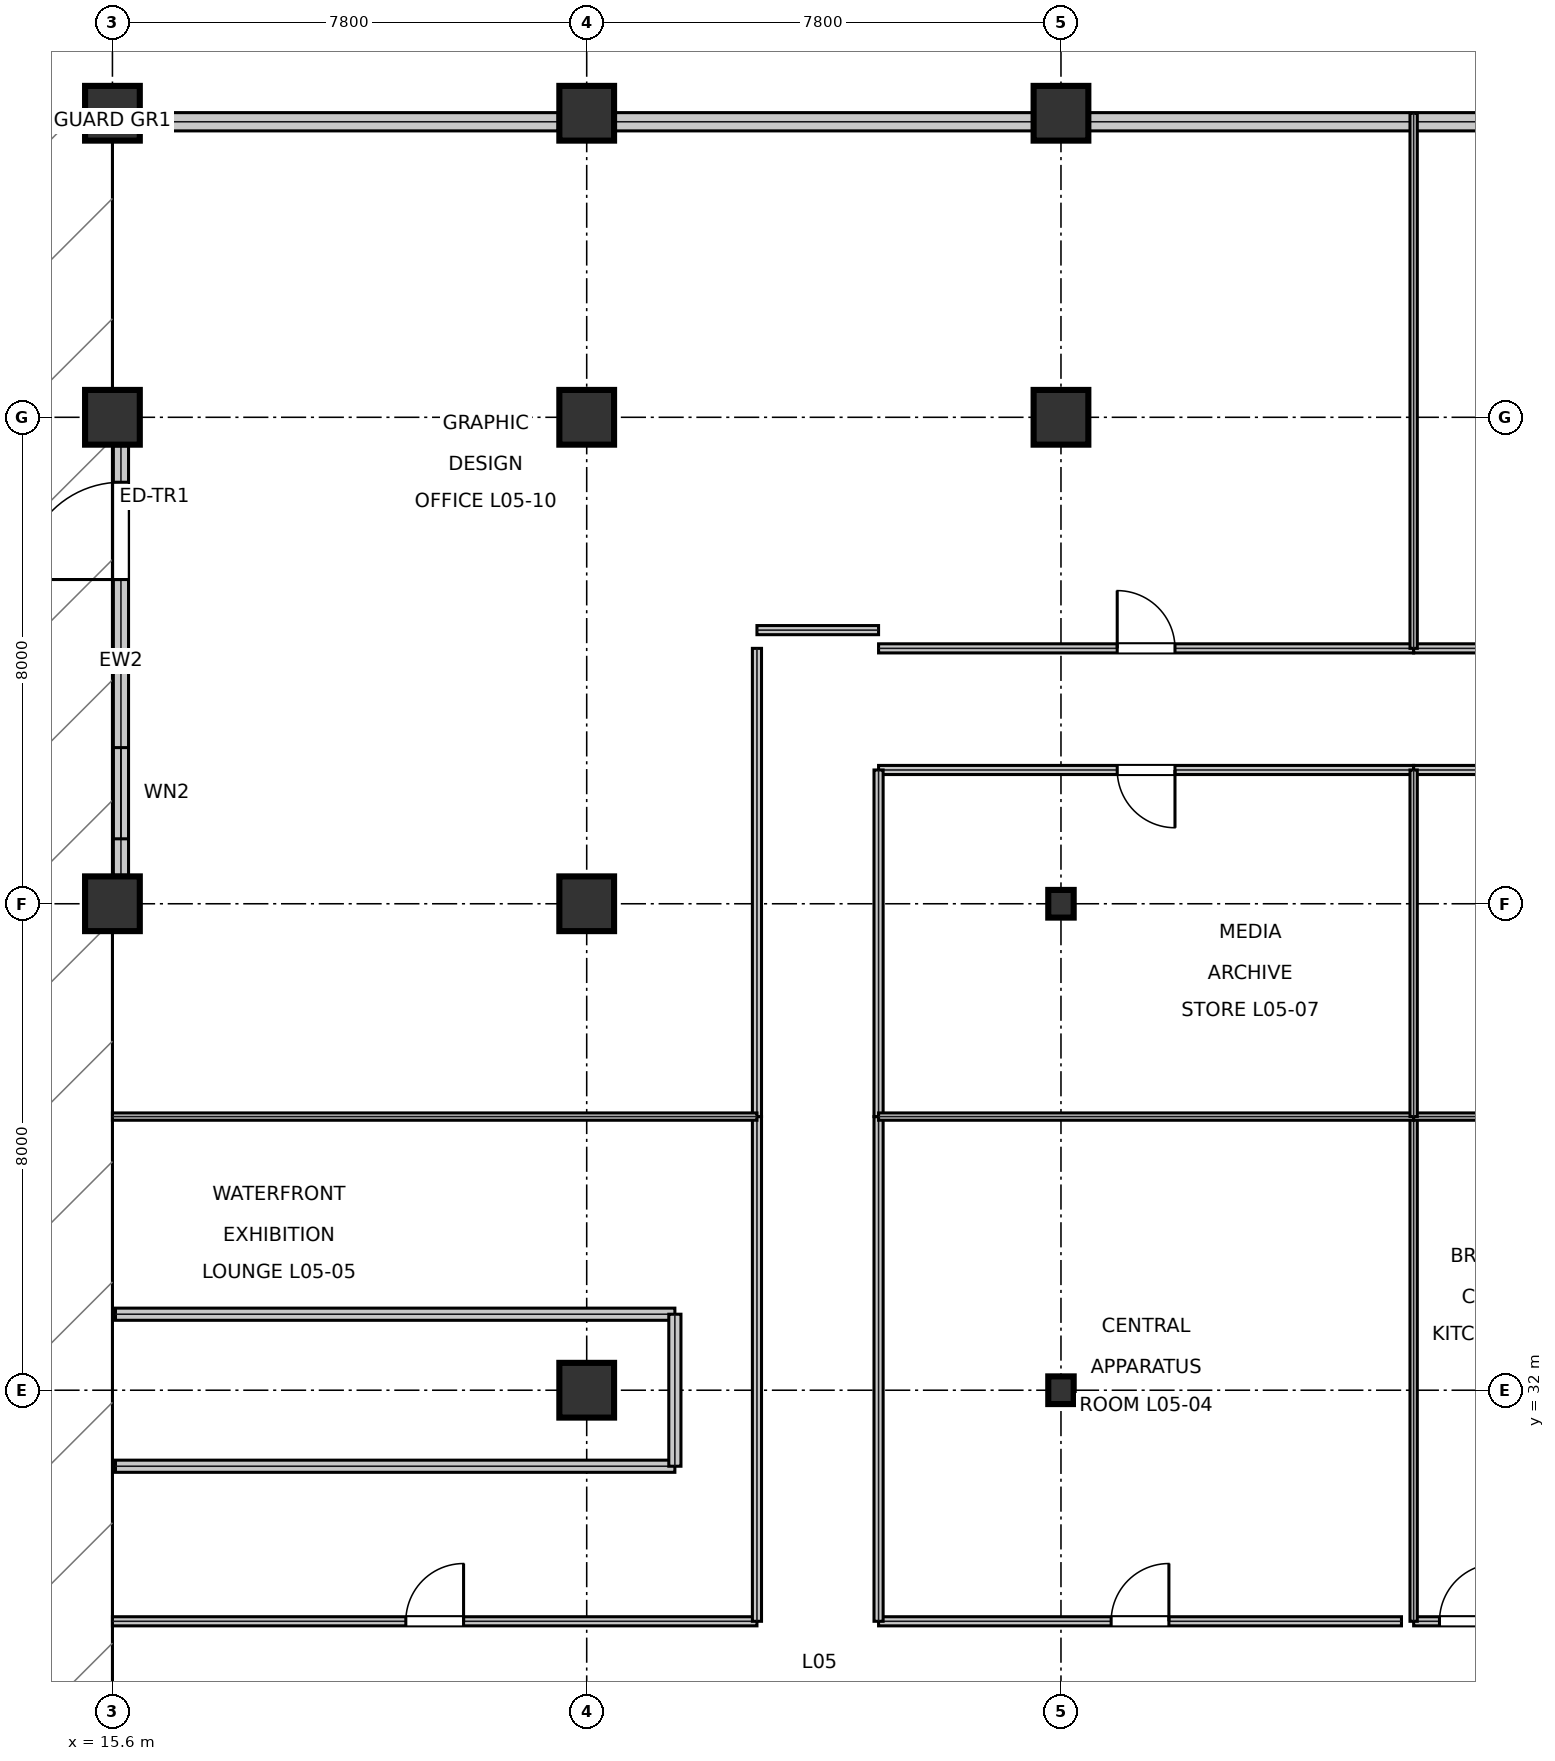
"""IFC4 building model, lengths in metres.
Left out: names, types, materials, properties, quantities, classifications, styles, units other than length and angle.
Written with IfcOpenShell. Run it as: python <this file> out.ifc"""

import sys

from ifc_helpers import new_model, si_unit, direction, frame, frame_2d, origin, origin_2d, place, context, subcontext, project, spatial, rectangle, i_section, extrude, element, fill, save


model = new_model("IFC4")
c1 = context("Model", 3, precision=1e-05, world=origin(), true_north=direction((0.0, 1.0)))
c2 = subcontext(c1, "Body", "Model", "MODEL_VIEW")
j1 = project(units=[si_unit("LENGTHUNIT", "METRE"), si_unit("PLANEANGLEUNIT", "RADIAN")], contexts=[c1])
p1 = place(None, origin())
s1 = spatial("IfcSite", under=j1, at=p1, CompositionType="ELEMENT")
p2 = place(p1, origin())
s2 = spatial("IfcBuilding", under=s1, at=p2, CompositionType="ELEMENT")
p3 = place(p2, frame((0.0, 0.0, 27.0)))
s3 = spatial("IfcBuildingStorey", under=s2, at=p3, CompositionType="ELEMENT", Elevation=27.0)
for number, where, z_axis, x_axis in (
    (1, (15.6, 40.0, 0.0), (0.0, 0.0, 1.0), (1.0, 0.0, 0.0)),
    (2, (15.6, 48.0, 0.0), (0.0, 0.0, 1.0), (1.0, 0.0, 0.0)),
    (3, (15.6, 53.0, 0.0), (0.0, 0.0, 1.0), (1.0, 0.0, 0.0)),
    (4, (23.4, 32.0, 0.0), (0.0, 0.0, 1.0), (1.0, 0.0, 0.0)),
    (5, (23.4, 40.0, 0.0), (0.0, 0.0, 1.0), (1.0, 0.0, 0.0)),
    (6, (23.4, 48.0, 0.0), (0.0, 0.0, 1.0), (1.0, 0.0, 0.0)),
    (7, (23.4, 53.0, 0.0), (0.0, 0.0, 1.0), (1.0, 0.0, 0.0)),
):
    element("IfcColumn", number, at=place(p3, frame(where, z_axis=z_axis, x_axis=x_axis)), inside=s3, PredefinedType="COLUMN", context=c2, shape_type="SweptSolid", body=[
        extrude(rectangle(XDim=0.9, YDim=0.9, at=origin_2d()), origin(), (0.0, 0.0, 1.0), 5.395),
    ])
for number, where, z_axis, x_axis in (
    (8, (31.2, 32.0, 0.0), (0.0, 0.0, 1.0), (1.0, 0.0, 0.0)),
    (9, (31.2, 40.0, 0.0), (0.0, 0.0, 1.0), (1.0, 0.0, 0.0)),
):
    element("IfcColumn", number, at=place(p3, frame(where, z_axis=z_axis, x_axis=x_axis)), inside=s3, PredefinedType="COLUMN", context=c2, shape_type="SweptSolid", body=[
        extrude(i_section(OverallWidth=0.418, OverallDepth=0.455, WebThickness=0.042, FlangeThickness=0.068, at=origin_2d()), origin(), (0.0, 0.0, 1.0), 5.395),
    ])
for number, where, z_axis, x_axis in (
    (10, (31.2, 48.0, 0.0), (0.0, 0.0, 1.0), (1.0, 0.0, 0.0)),
    (11, (31.2, 53.0, 0.0), (0.0, 0.0, 1.0), (1.0, 0.0, 0.0)),
):
    element("IfcColumn", number, at=place(p3, frame(where, z_axis=z_axis, x_axis=x_axis)), inside=s3, PredefinedType="COLUMN", context=c2, shape_type="SweptSolid", body=[
        extrude(rectangle(XDim=0.9, YDim=0.9, at=origin_2d()), origin(), (0.0, 0.0, 1.0), 5.395),
    ])
p4 = place(p3, frame((15.74, 47.532, 0.0), z_axis=(0.0, 0.0, 1.0), x_axis=(0.0, -1.0, 0.0)))
e12 = element("IfcWall", 12, at=p4, inside=s3, PredefinedType="STANDARD", context=c2, shape_type="SweptSolid", body=[
    extrude(rectangle(XDim=7.064, YDim=0.25, at=frame_2d((3.532, 0.0))), origin(), (0.0, 0.0, 1.0), 4.375),
])
p5 = place(p4, frame((0.6, 0.0, 0.0)))
e13 = element("IfcOpeningElement", 13, at=p5, cuts=e12, PredefinedType="OPENING", context=c2, shape_type="SweptSolid", body=[
    extrude(rectangle(XDim=1.6, YDim=2.2, at=frame_2d((0.8, 1.1))), frame((0.0, 0.135, 0.0), z_axis=(0.0, -1.0, 0.0), x_axis=(1.0, 0.0, 0.0)), (0.0, 0.0, 1.0), 0.27),
])
p6 = place(p4, frame((4.964, 0.0, 0.95)))
e14 = element("IfcOpeningElement", 14, at=p6, cuts=e12, PredefinedType="OPENING", context=c2, shape_type="SweptSolid", body=[
    extrude(rectangle(XDim=1.5, YDim=1.6, at=frame_2d((0.75, 0.8))), frame((0.0, 0.135, 0.0), z_axis=(0.0, -1.0, 0.0), x_axis=(1.0, 0.0, 0.0)), (0.0, 0.0, 1.0), 0.27),
])
for number, where, z_axis, x_axis in (
    (15, (38.532, 52.86, 0.0), (0.0, 0.0, 1.0), (-1.0, 0.0, 0.0)),
    (16, (30.732, 52.86, 0.0), (0.0, 0.0, 1.0), (-1.0, 0.0, 0.0)),
):
    element("IfcWall", number, at=place(p3, frame(where, z_axis=z_axis, x_axis=x_axis)), inside=s3, PredefinedType="STANDARD", context=c2, shape_type="SweptSolid", body=[
        extrude(rectangle(XDim=6.864, YDim=0.3, at=frame_2d((3.432, 0.0))), origin(), (0.0, 0.0, 1.0), 4.608),
    ])
p7 = place(p3, frame((22.932, 52.86, 0.0), z_axis=(0.0, 0.0, 1.0), x_axis=(-1.0, 0.0, 0.0)))
e17 = element("IfcWall", 17, at=p7, inside=s3, PredefinedType="STANDARD", context=c2, shape_type="SweptSolid", body=[
    extrude(rectangle(XDim=6.864, YDim=0.3, at=frame_2d((3.432, 0.0))), origin(), (0.0, 0.0, 1.0), 4.608),
])
for number, where, z_axis, x_axis in (
    (18, (15.65, 30.75, 0.0), (0.0, 0.0, 1.0), (1.0, 0.0, 0.0)),
    (19, (15.65, 33.25, 0.0), (0.0, 0.0, 1.0), (1.0, 0.0, 0.0)),
):
    element("IfcWall", number, at=place(p3, frame(where, z_axis=z_axis, x_axis=x_axis)), inside=s3, PredefinedType="SOLIDWALL", context=c2, shape_type="SweptSolid", body=[
        extrude(rectangle(XDim=9.2, YDim=0.2, at=frame_2d((4.6, 0.0))), origin(), (0.0, 0.0, 1.0), 3.648),
    ])
p8 = place(p3, frame((24.85, 30.75, 0.0), z_axis=(0.0, 0.0, 1.0), x_axis=(0.0, 1.0, 0.0)))
e20 = element("IfcWall", 20, at=p8, inside=s3, PredefinedType="SOLIDWALL", context=c2, shape_type="SweptSolid", body=[
    extrude(rectangle(XDim=2.5, YDim=0.2, at=frame_2d((1.25, 0.0))), origin(), (0.0, 0.0, 1.0), 4.298),
])
p9 = place(p3, frame((28.2, 28.2, 0.0), z_axis=(0.0, 0.0, 1.0), x_axis=(1.0, 0.0, 0.0)))
e21 = element("IfcWall", 21, at=p9, inside=s3, PredefinedType="PARTITIONING", context=c2, shape_type="SweptSolid", body=[
    extrude(rectangle(XDim=8.6, YDim=0.15, at=frame_2d((4.3, 0.0))), origin(), (0.0, 0.0, 1.0), 4.375),
])
p10 = place(p9, frame((3.825, 0.0, 0.0)))
e22 = element("IfcOpeningElement", 22, at=p10, cuts=e21, PredefinedType="OPENING", context=c2, shape_type="SweptSolid", body=[
    extrude(rectangle(XDim=0.95, YDim=2.15, at=frame_2d((0.475, 1.075))), frame((0.0, 0.085, 0.0), z_axis=(0.0, -1.0, 0.0), x_axis=(1.0, 0.0, 0.0)), (0.0, 0.0, 1.0), 0.17),
])
p11 = place(p3, frame((15.6, 28.2, 0.0), z_axis=(0.0, 0.0, 1.0), x_axis=(1.0, 0.0, 0.0)))
e23 = element("IfcWall", 23, at=p11, inside=s3, PredefinedType="PARTITIONING", context=c2, shape_type="SweptSolid", body=[
    extrude(rectangle(XDim=10.6, YDim=0.15, at=frame_2d((5.3, 0.0))), origin(), (0.0, 0.0, 1.0), 3.648),
])
p12 = place(p11, frame((4.825, 0.0, 0.0)))
e24 = element("IfcOpeningElement", 24, at=p12, cuts=e23, PredefinedType="OPENING", context=c2, shape_type="SweptSolid", body=[
    extrude(rectangle(XDim=0.95, YDim=2.15, at=frame_2d((0.475, 1.075))), frame((0.0, 0.085, 0.0), z_axis=(0.0, -1.0, 0.0), x_axis=(1.0, 0.0, 0.0)), (0.0, 0.0, 1.0), 0.17),
])
p13 = place(p3, frame((37.0, 28.2, 0.0), z_axis=(0.0, 0.0, 1.0), x_axis=(1.0, 0.0, 0.0)))
e25 = element("IfcWall", 25, at=p13, inside=s3, PredefinedType="PARTITIONING", context=c2, shape_type="SweptSolid", body=[
    extrude(rectangle(XDim=1.8, YDim=0.15, at=frame_2d((0.9, 0.0))), origin(), (0.0, 0.0, 1.0), 5.08),
])
p14 = place(p13, frame((0.425, 0.0, 0.0)))
e26 = element("IfcOpeningElement", 26, at=p14, cuts=e25, PredefinedType="OPENING", context=c2, shape_type="SweptSolid", body=[
    extrude(rectangle(XDim=0.95, YDim=2.15, at=frame_2d((0.475, 1.075))), frame((0.0, 0.085, 0.0), z_axis=(0.0, -1.0, 0.0), x_axis=(1.0, 0.0, 0.0)), (0.0, 0.0, 1.0), 0.17),
])
p15 = place(p3, frame((28.2, 42.2, 0.0), z_axis=(0.0, 0.0, 1.0), x_axis=(1.0, 0.0, 0.0)))
e27 = element("IfcWall", 27, at=p15, inside=s3, PredefinedType="PARTITIONING", context=c2, shape_type="SweptSolid", body=[
    extrude(rectangle(XDim=8.8, YDim=0.15, at=frame_2d((4.4, 0.0))), origin(), (0.0, 0.0, 1.0), 4.375),
])
p16 = place(p15, frame((3.925, 0.0, 0.0)))
e28 = element("IfcOpeningElement", 28, at=p16, cuts=e27, PredefinedType="OPENING", context=c2, shape_type="SweptSolid", body=[
    extrude(rectangle(XDim=0.95, YDim=2.15, at=frame_2d((0.475, 1.075))), frame((0.0, 0.085, 0.0), z_axis=(0.0, -1.0, 0.0), x_axis=(1.0, 0.0, 0.0)), (0.0, 0.0, 1.0), 0.17),
])
p17 = place(p3, frame((37.0, 42.2, 0.0), z_axis=(0.0, 0.0, 1.0), x_axis=(1.0, 0.0, 0.0)))
e29 = element("IfcWall", 29, at=p17, inside=s3, PredefinedType="PARTITIONING", context=c2, shape_type="SweptSolid", body=[
    extrude(rectangle(XDim=9.8, YDim=0.15, at=frame_2d((4.9, 0.0))), origin(), (0.0, 0.0, 1.0), 4.375),
])
p18 = place(p17, frame((4.425, 0.0, 0.0)))
e30 = element("IfcOpeningElement", 30, at=p18, cuts=e29, PredefinedType="OPENING", context=c2, shape_type="SweptSolid", body=[
    extrude(rectangle(XDim=0.95, YDim=2.15, at=frame_2d((0.475, 1.075))), frame((0.0, 0.085, 0.0), z_axis=(0.0, -1.0, 0.0), x_axis=(1.0, 0.0, 0.0)), (0.0, 0.0, 1.0), 0.17),
])
p19 = place(p3, frame((28.2, 44.2, 0.0), z_axis=(0.0, 0.0, 1.0), x_axis=(1.0, 0.0, 0.0)))
e31 = element("IfcWall", 31, at=p19, inside=s3, PredefinedType="PARTITIONING", context=c2, shape_type="SweptSolid", body=[
    extrude(rectangle(XDim=8.8, YDim=0.15, at=frame_2d((4.4, 0.0))), origin(), (0.0, 0.0, 1.0), 4.375),
])
p20 = place(p19, frame((3.925, 0.0, 0.0)))
e32 = element("IfcOpeningElement", 32, at=p20, cuts=e31, PredefinedType="OPENING", context=c2, shape_type="SweptSolid", body=[
    extrude(rectangle(XDim=0.95, YDim=2.15, at=frame_2d((0.475, 1.075))), frame((0.0, 0.085, 0.0), z_axis=(0.0, -1.0, 0.0), x_axis=(1.0, 0.0, 0.0)), (0.0, 0.0, 1.0), 0.17),
])
p21 = place(p3, frame((37.0, 44.2, 0.0), z_axis=(0.0, 0.0, 1.0), x_axis=(1.0, 0.0, 0.0)))
e33 = element("IfcWall", 33, at=p21, inside=s3, PredefinedType="PARTITIONING", context=c2, shape_type="SweptSolid", body=[
    extrude(rectangle(XDim=9.8, YDim=0.15, at=frame_2d((4.9, 0.0))), origin(), (0.0, 0.0, 1.0), 4.375),
])
p22 = place(p21, frame((4.425, 0.0, 0.0)))
e34 = element("IfcOpeningElement", 34, at=p22, cuts=e33, PredefinedType="OPENING", context=c2, shape_type="SweptSolid", body=[
    extrude(rectangle(XDim=0.95, YDim=2.15, at=frame_2d((0.475, 1.075))), frame((0.0, 0.085, 0.0), z_axis=(0.0, -1.0, 0.0), x_axis=(1.0, 0.0, 0.0)), (0.0, 0.0, 1.0), 0.17),
])
for number, where, z_axis, x_axis in (
    (35, (28.2, 28.2, 0.0), (0.0, 0.0, 1.0), (0.0, 1.0, 0.0)),
    (36, (26.2, 28.2, 0.0), (0.0, 0.0, 1.0), (0.0, 1.0, 0.0)),
):
    element("IfcWall", number, at=place(p3, frame(where, z_axis=z_axis, x_axis=x_axis)), inside=s3, PredefinedType="PARTITIONING", context=c2, shape_type="SweptSolid", body=[
        extrude(rectangle(XDim=8.3, YDim=0.15, at=frame_2d((4.15, 0.0))), origin(), (0.0, 0.0, 1.0), 4.298),
    ])
p23 = place(p3, frame((28.2, 36.5, 0.0), z_axis=(0.0, 0.0, 1.0), x_axis=(0.0, 1.0, 0.0)))
e37 = element("IfcWall", 37, at=p23, inside=s3, PredefinedType="PARTITIONING", context=c2, shape_type="SweptSolid", body=[
    extrude(rectangle(XDim=5.7, YDim=0.15, at=frame_2d((2.85, 0.0))), origin(), (0.0, 0.0, 1.0), 4.298),
])
p24 = place(p3, frame((26.2, 36.5, 0.0), z_axis=(0.0, 0.0, 1.0), x_axis=(0.0, 1.0, 0.0)))
e38 = element("IfcWall", 38, at=p24, inside=s3, PredefinedType="PARTITIONING", context=c2, shape_type="SweptSolid", body=[
    extrude(rectangle(XDim=7.7, YDim=0.15, at=frame_2d((3.85, 0.0))), origin(), (0.0, 0.0, 1.0), 4.298),
])
p25 = place(p3, frame((26.2, 44.5, 0.0), z_axis=(0.0, 0.0, 1.0), x_axis=(1.0, 0.0, 0.0)))
e39 = element("IfcWall", 39, at=p25, inside=s3, PredefinedType="PARTITIONING", context=c2, shape_type="SweptSolid", body=[
    extrude(rectangle(XDim=2.0, YDim=0.15, at=frame_2d((1.0, 0.0))), origin(), (0.0, 0.0, 1.0), 4.661),
])
p26 = place(p3, frame((37.0, 28.2, 0.0), z_axis=(0.0, 0.0, 1.0), x_axis=(0.0, 1.0, 0.0)))
e40 = element("IfcWall", 40, at=p26, inside=s3, PredefinedType="PARTITIONING", context=c2, shape_type="SweptSolid", body=[
    extrude(rectangle(XDim=8.3, YDim=0.12, at=frame_2d((4.15, 0.0))), origin(), (0.0, 0.0, 1.0), 4.298),
])
p27 = place(p3, frame((28.2, 36.5, 0.0), z_axis=(0.0, 0.0, 1.0), x_axis=(1.0, 0.0, 0.0)))
e41 = element("IfcWall", 41, at=p27, inside=s3, PredefinedType="PARTITIONING", context=c2, shape_type="SweptSolid", body=[
    extrude(rectangle(XDim=8.8, YDim=0.12, at=frame_2d((4.4, 0.0))), origin(), (0.0, 0.0, 1.0), 4.375),
])
p28 = place(p3, frame((15.6, 36.5, 0.0), z_axis=(0.0, 0.0, 1.0), x_axis=(1.0, 0.0, 0.0)))
e42 = element("IfcWall", 42, at=p28, inside=s3, PredefinedType="PARTITIONING", context=c2, shape_type="SweptSolid", body=[
    extrude(rectangle(XDim=10.6, YDim=0.12, at=frame_2d((5.3, 0.0))), origin(), (0.0, 0.0, 1.0), 3.648),
])
p29 = place(p3, frame((37.0, 36.5, 0.0), z_axis=(0.0, 0.0, 1.0), x_axis=(1.0, 0.0, 0.0)))
e43 = element("IfcWall", 43, at=p29, inside=s3, PredefinedType="PARTITIONING", context=c2, shape_type="SweptSolid", body=[
    extrude(rectangle(XDim=3.1, YDim=0.12, at=frame_2d((1.55, 0.0))), origin(), (0.0, 0.0, 1.0), 4.375),
])
p30 = place(p3, frame((37.0, 36.5, 0.0), z_axis=(0.0, 0.0, 1.0), x_axis=(0.0, 1.0, 0.0)))
e44 = element("IfcWall", 44, at=p30, inside=s3, PredefinedType="PARTITIONING", context=c2, shape_type="SweptSolid", body=[
    extrude(rectangle(XDim=5.7, YDim=0.12, at=frame_2d((2.85, 0.0))), origin(), (0.0, 0.0, 1.0), 4.298),
])
p31 = place(p3, frame((37.0, 44.2, 0.0), z_axis=(0.0, 0.0, 1.0), x_axis=(0.0, 1.0, 0.0)))
e45 = element("IfcWall", 45, at=p31, inside=s3, PredefinedType="PARTITIONING", context=c2, shape_type="SweptSolid", body=[
    extrude(rectangle(XDim=8.8, YDim=0.12, at=frame_2d((4.4, 0.0))), origin(), (0.0, 0.0, 1.0), 4.298),
])
p32 = place(p5, frame((1.6, 0.0, 0.0), z_axis=(0.0, 0.0, 1.0), x_axis=(-1.0, 0.0, 0.0)))
e46 = element("IfcDoor", 46, at=p32, inside=s3, OperationType="SINGLE_SWING_LEFT", PredefinedType="DOOR", context=c2, shape_type="SweptSolid", body=[
    extrude(rectangle(XDim=1.6, YDim=2.2, at=frame_2d((0.8, 1.1))), frame((0.0, 0.025, 0.0), z_axis=(0.0, -1.0, 0.0), x_axis=(1.0, 0.0, 0.0)), (0.0, 0.0, 1.0), 0.05),
])
fill(e13, e46)
p33 = place(p6, origin())
e47 = element("IfcWindow", 47, at=p33, inside=s3, PartitioningType="SINGLE_PANEL", PredefinedType="WINDOW", context=c2, shape_type="SweptSolid", body=[
    extrude(rectangle(XDim=1.5, YDim=1.6, at=frame_2d((0.75, 0.8))), frame((0.0, 0.03, 0.0), z_axis=(0.0, -1.0, 0.0), x_axis=(1.0, 0.0, 0.0)), (0.0, 0.0, 1.0), 0.06),
])
fill(e14, e47)
p34 = place(p10, origin())
e48 = element("IfcDoor", 48, at=p34, inside=s3, OperationType="SINGLE_SWING_RIGHT", PredefinedType="DOOR", context=c2, shape_type="SweptSolid", body=[
    extrude(rectangle(XDim=0.95, YDim=2.15, at=frame_2d((0.475, 1.075))), frame((0.0, 0.025, 0.0), z_axis=(0.0, -1.0, 0.0), x_axis=(1.0, 0.0, 0.0)), (0.0, 0.0, 1.0), 0.05),
])
fill(e22, e48)
p35 = place(p12, origin())
e49 = element("IfcDoor", 49, at=p35, inside=s3, OperationType="SINGLE_SWING_RIGHT", PredefinedType="DOOR", context=c2, shape_type="SweptSolid", body=[
    extrude(rectangle(XDim=0.95, YDim=2.15, at=frame_2d((0.475, 1.075))), frame((0.0, 0.025, 0.0), z_axis=(0.0, -1.0, 0.0), x_axis=(1.0, 0.0, 0.0)), (0.0, 0.0, 1.0), 0.05),
])
fill(e24, e49)
p36 = place(p14, origin())
e50 = element("IfcDoor", 50, at=p36, inside=s3, OperationType="SINGLE_SWING_RIGHT", PredefinedType="DOOR", context=c2, shape_type="SweptSolid", body=[
    extrude(rectangle(XDim=0.95, YDim=2.15, at=frame_2d((0.475, 1.075))), frame((0.0, 0.025, 0.0), z_axis=(0.0, -1.0, 0.0), x_axis=(1.0, 0.0, 0.0)), (0.0, 0.0, 1.0), 0.05),
])
fill(e26, e50)
p37 = place(p16, frame((0.95, 0.0, 0.0), z_axis=(0.0, 0.0, 1.0), x_axis=(-1.0, 0.0, 0.0)))
e51 = element("IfcDoor", 51, at=p37, inside=s3, OperationType="SINGLE_SWING_LEFT", PredefinedType="DOOR", context=c2, shape_type="SweptSolid", body=[
    extrude(rectangle(XDim=0.95, YDim=2.15, at=frame_2d((0.475, 1.075))), frame((0.0, 0.025, 0.0), z_axis=(0.0, -1.0, 0.0), x_axis=(1.0, 0.0, 0.0)), (0.0, 0.0, 1.0), 0.05),
])
fill(e28, e51)
p38 = place(p20, origin())
e52 = element("IfcDoor", 52, at=p38, inside=s3, OperationType="SINGLE_SWING_LEFT", PredefinedType="DOOR", context=c2, shape_type="SweptSolid", body=[
    extrude(rectangle(XDim=0.95, YDim=2.15, at=frame_2d((0.475, 1.075))), frame((0.0, 0.025, 0.0), z_axis=(0.0, -1.0, 0.0), x_axis=(1.0, 0.0, 0.0)), (0.0, 0.0, 1.0), 0.05),
])
fill(e32, e52)
save(model, sys.argv[1])
